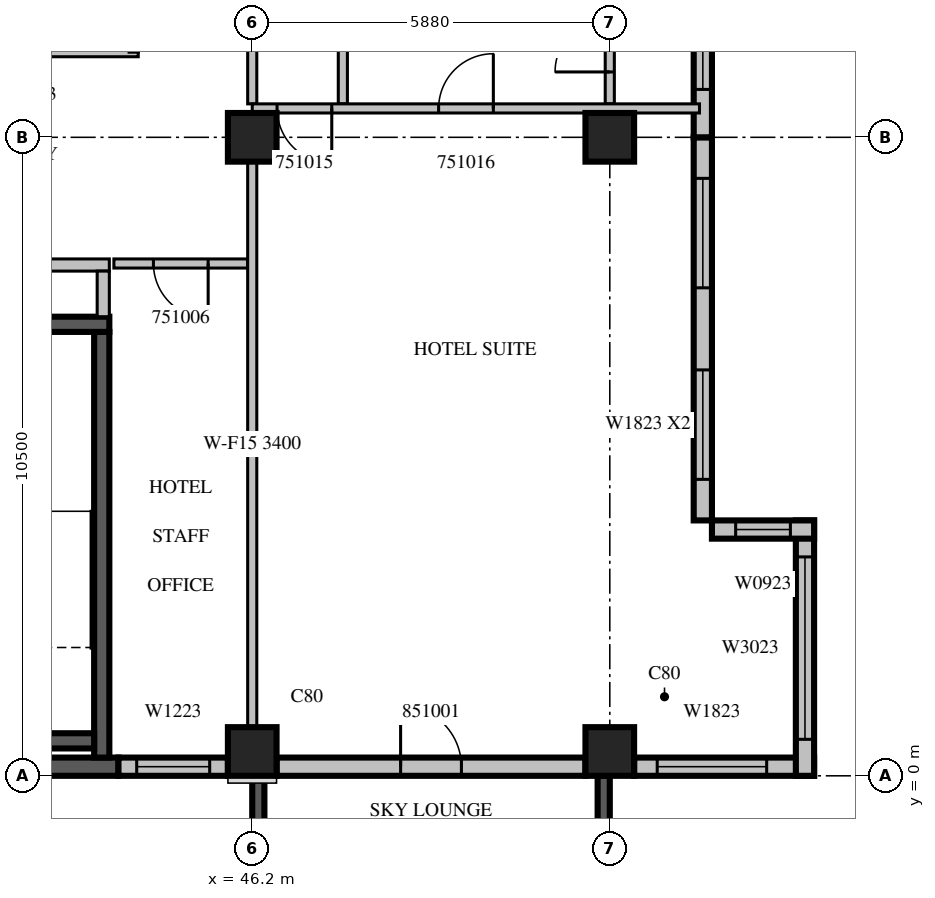
"""IFC4 building model, lengths in metres.
Left out: names, types, materials, properties, quantities, classifications, styles, units other than length and angle.
Written with IfcOpenShell. Run it as: python <this file> out.ifc"""

import sys

from ifc_helpers import new_model, si_unit, direction, frame, frame_2d, origin, origin_2d, place, context, subcontext, project, spatial, rectangle, extrude, source, transform, mapped, element, fill, save


model = new_model("IFC4")
c1 = context("Model", 3, precision=1e-05, world=origin(), true_north=direction((0.0, 1.0)))
c2 = subcontext(c1, "Body", "Model", "MODEL_VIEW")
j1 = project(units=[si_unit("LENGTHUNIT", "METRE"), si_unit("PLANEANGLEUNIT", "RADIAN")], contexts=[c1])
p1 = place(None, origin())
s1 = spatial("IfcSite", under=j1, at=p1, CompositionType="ELEMENT")
p2 = place(p1, origin())
s2 = spatial("IfcBuilding", under=s1, at=p2, CompositionType="ELEMENT")
p3 = place(p2, frame((0.0, 0.0, 227.2)))
s3 = spatial("IfcBuildingStorey", under=s2, at=p3, CompositionType="ELEMENT", Elevation=227.2)
m1 = source(origin(), c2, "Body", "SweptSolid", [
    extrude(rectangle(XDim=0.8, YDim=0.8, at=origin_2d()), origin(), (0.0, 0.0, 1.0), 3.8),
])
for number, where, z_axis, x_axis in (
    (1, (46.2, 0.4, 0.0), (0.0, 0.0, 1.0), (1.0, 0.0, 0.0)),
    (2, (52.08, 0.4, 0.0), (0.0, 0.0, 1.0), (1.0, 0.0, 0.0)),
    (3, (46.2, 10.5, 0.0), (0.0, 0.0, 1.0), (1.0, 0.0, 0.0)),
    (4, (52.08, 10.5, 0.0), (0.0, 0.0, 1.0), (1.0, 0.0, 0.0)),
):
    element("IfcColumn", number, at=place(p3, frame(where, z_axis=z_axis, x_axis=x_axis)), inside=s3, PredefinedType="COLUMN", context=c2, shape_type="MappedRepresentation", body=[
        mapped(m1, transform((0.0, 0.0, 0.0), scale=1.0)),
    ])
m2 = source(origin(), c2, "Body", "SweptSolid", [
    extrude(rectangle(XDim=3.9, YDim=0.2, at=frame_2d((1.95, 0.0))), origin(), (0.0, 0.0, 1.0), 3.4),
])
p4 = place(p3, frame((46.3, 0.0, 0.0), z_axis=(0.0, 0.0, 1.0), x_axis=(0.0, -1.0, 0.0)))
e5 = element("IfcWall", 5, at=p4, inside=s3, PredefinedType="SOLIDWALL", context=c2, shape_type="MappedRepresentation", body=[
    mapped(m2, transform((0.0, 0.0, 0.0), scale=1.0)),
])
m3 = source(origin(), c2, "Body", "SweptSolid", [
    extrude(rectangle(XDim=2.4, YDim=2.3, at=frame_2d((1.2, 1.15))), frame((0.0, 0.11, 0.0), z_axis=(0.0, -1.0, 0.0), x_axis=(1.0, 0.0, 0.0)), (0.0, 0.0, 1.0), 0.22),
])
p5 = place(p4, frame((0.75, 0.0, 0.6)))
e6 = element("IfcOpeningElement", 6, at=p5, cuts=e5, PredefinedType="OPENING", context=c2, shape_type="MappedRepresentation", body=[
    mapped(m3, transform((0.0, 0.0, 0.0), scale=1.0)),
])
p6 = place(p3, frame((51.98, 0.0, 0.0), z_axis=(0.0, 0.0, 1.0), x_axis=(0.0, -1.0, 0.0)))
e7 = element("IfcWall", 7, at=p6, inside=s3, PredefinedType="SOLIDWALL", context=c2, shape_type="MappedRepresentation", body=[
    mapped(m2, transform((0.0, 0.0, 0.0), scale=1.0)),
])
p7 = place(p6, frame((0.75, 0.0, 0.6)))
e8 = element("IfcOpeningElement", 8, at=p7, cuts=e7, PredefinedType="OPENING", context=c2, shape_type="MappedRepresentation", body=[
    mapped(m3, transform((0.0, 0.0, 0.0), scale=1.0)),
])
m4 = source(origin(), c2, "Body", "SweptSolid", [
    extrude(rectangle(XDim=3.8, YDim=0.3, at=frame_2d((1.9, 0.0))), origin(), (0.0, 0.0, 1.0), 3.4),
])
p8 = place(p3, frame((40.2, 0.15, 0.0), z_axis=(0.0, 0.0, 1.0), x_axis=(1.0, 0.0, 0.0)))
e9 = element("IfcWall", 9, at=p8, inside=s3, PredefinedType="SOLIDWALL", context=c2, shape_type="MappedRepresentation", body=[
    mapped(m4, transform((0.0, 0.0, 0.0), scale=1.0)),
])
p9 = place(p3, frame((44.0, 0.15, 0.0), z_axis=(0.0, 0.0, 1.0), x_axis=(1.0, 0.0, 0.0)))
e10 = element("IfcWall", 10, at=p9, inside=s3, PredefinedType="STANDARD", context=c2, shape_type="SweptSolid", body=[
    extrude(rectangle(XDim=1.8, YDim=0.3, at=frame_2d((0.9, 0.0))), origin(), (0.0, 0.0, 1.0), 3.4),
])
m5 = source(origin(), c2, "Body", "SweptSolid", [
    extrude(rectangle(XDim=1.2, YDim=2.3, at=frame_2d((0.6, 1.15))), frame((0.0, 0.16, 0.0), z_axis=(0.0, -1.0, 0.0), x_axis=(1.0, 0.0, 0.0)), (0.0, 0.0, 1.0), 0.32),
])
p10 = place(p9, frame((0.3, 0.0, 0.6)))
e11 = element("IfcOpeningElement", 11, at=p10, cuts=e10, PredefinedType="OPENING", context=c2, shape_type="MappedRepresentation", body=[
    mapped(m5, transform((0.0, 0.0, 0.0), scale=1.0)),
])
p11 = place(p3, frame((46.6, 0.15, 0.0), z_axis=(0.0, 0.0, 1.0), x_axis=(1.0, 0.0, 0.0)))
e12 = element("IfcWall", 12, at=p11, inside=s3, PredefinedType="STANDARD", context=c2, shape_type="SweptSolid", body=[
    extrude(rectangle(XDim=5.08, YDim=0.3, at=frame_2d((2.54, 0.0))), origin(), (0.0, 0.0, 1.0), 3.4),
])
m6 = source(origin(), c2, "Body", "SweptSolid", [
    extrude(rectangle(XDim=1.0, YDim=2.1, at=frame_2d((0.5, 1.05))), frame((0.0, 0.16, 0.0), z_axis=(0.0, -1.0, 0.0), x_axis=(1.0, 0.0, 0.0)), (0.0, 0.0, 1.0), 0.32),
])
p12 = place(p11, frame((2.04, 0.0, 0.0)))
e13 = element("IfcOpeningElement", 13, at=p12, cuts=e12, PredefinedType="OPENING", context=c2, shape_type="MappedRepresentation", body=[
    mapped(m6, transform((0.0, 0.0, 0.0), scale=1.0)),
])
p13 = place(p3, frame((52.48, 0.15, 0.0), z_axis=(0.0, 0.0, 1.0), x_axis=(1.0, 0.0, 0.0)))
e14 = element("IfcWall", 14, at=p13, inside=s3, PredefinedType="STANDARD", context=c2, shape_type="SweptSolid", body=[
    extrude(rectangle(XDim=2.96, YDim=0.3, at=frame_2d((1.48, 0.0))), origin(), (0.0, 0.0, 1.0), 3.4),
])
m7 = source(origin(), c2, "Body", "SweptSolid", [
    extrude(rectangle(XDim=1.8, YDim=2.3, at=frame_2d((0.9, 1.15))), frame((0.0, 0.16, 0.0), z_axis=(0.0, -1.0, 0.0), x_axis=(1.0, 0.0, 0.0)), (0.0, 0.0, 1.0), 0.32),
])
p14 = place(p13, frame((0.38, 0.0, 0.6)))
e15 = element("IfcOpeningElement", 15, at=p14, cuts=e14, PredefinedType="OPENING", context=c2, shape_type="MappedRepresentation", body=[
    mapped(m7, transform((0.0, 0.0, 0.0), scale=1.0)),
])
m8 = source(origin(), c2, "Body", "SweptSolid", [
    extrude(rectangle(XDim=4.2, YDim=0.3, at=frame_2d((2.1, 0.0))), origin(), (0.0, 0.0, 1.0), 3.4),
])
p15 = place(p3, frame((55.29, 0.0, 0.0), z_axis=(0.0, 0.0, 1.0), x_axis=(0.0, 1.0, 0.0)))
e16 = element("IfcWall", 16, at=p15, inside=s3, PredefinedType="STANDARD", context=c2, shape_type="MappedRepresentation", body=[
    mapped(m8, transform((0.0, 0.0, 0.0), scale=1.0)),
])
m9 = source(origin(), c2, "Body", "SweptSolid", [
    extrude(rectangle(XDim=3.0, YDim=2.3, at=frame_2d((1.5, 1.15))), frame((0.0, 0.16, 0.0), z_axis=(0.0, -1.0, 0.0), x_axis=(1.0, 0.0, 0.0)), (0.0, 0.0, 1.0), 0.32),
])
p16 = place(p15, frame((0.6, 0.0, 0.6)))
e17 = element("IfcOpeningElement", 17, at=p16, cuts=e16, PredefinedType="OPENING", context=c2, shape_type="MappedRepresentation", body=[
    mapped(m9, transform((0.0, 0.0, 0.0), scale=1.0)),
])
m10 = source(origin(), c2, "Body", "SweptSolid", [
    extrude(rectangle(XDim=1.68, YDim=0.3, at=frame_2d((0.84, 0.0))), origin(), (0.0, 0.0, 1.0), 3.4),
])
p17 = place(p3, frame((55.44, 4.05, 0.0), z_axis=(0.0, 0.0, 1.0), x_axis=(-1.0, 0.0, 0.0)))
e18 = element("IfcWall", 18, at=p17, inside=s3, PredefinedType="STANDARD", context=c2, shape_type="MappedRepresentation", body=[
    mapped(m10, transform((0.0, 0.0, 0.0), scale=1.0)),
])
m11 = source(origin(), c2, "Body", "SweptSolid", [
    extrude(rectangle(XDim=0.9, YDim=2.3, at=frame_2d((0.45, 1.15))), frame((0.0, 0.16, 0.0), z_axis=(0.0, -1.0, 0.0), x_axis=(1.0, 0.0, 0.0)), (0.0, 0.0, 1.0), 0.32),
])
p18 = place(p17, frame((0.39, 0.0, 0.6)))
e19 = element("IfcOpeningElement", 19, at=p18, cuts=e18, PredefinedType="OPENING", context=c2, shape_type="MappedRepresentation", body=[
    mapped(m11, transform((0.0, 0.0, 0.0), scale=1.0)),
])
m12 = source(origin(), c2, "Body", "SweptSolid", [
    extrude(rectangle(XDim=6.3, YDim=0.3, at=frame_2d((3.15, 0.0))), origin(), (0.0, 0.0, 1.0), 3.4),
])
p19 = place(p3, frame((53.61, 4.2, 0.0), z_axis=(0.0, 0.0, 1.0), x_axis=(0.0, 1.0, 0.0)))
e20 = element("IfcWall", 20, at=p19, inside=s3, PredefinedType="STANDARD", context=c2, shape_type="MappedRepresentation", body=[
    mapped(m12, transform((0.0, 0.0, 0.0), scale=1.0)),
])
p20 = place(p19, frame((0.675, 0.0, 0.6)))
e21 = element("IfcOpeningElement", 21, at=p20, cuts=e20, PredefinedType="OPENING", context=c2, shape_type="MappedRepresentation", body=[
    mapped(m7, transform((0.0, 0.0, 0.0), scale=1.0)),
])
p21 = place(p19, frame((3.825, 0.0, 0.6)))
e22 = element("IfcOpeningElement", 22, at=p21, cuts=e20, PredefinedType="OPENING", context=c2, shape_type="MappedRepresentation", body=[
    mapped(m7, transform((0.0, 0.0, 0.0), scale=1.0)),
])
m13 = source(origin(), c2, "Body", "SweptSolid", [
    extrude(rectangle(XDim=3.375, YDim=0.3, at=frame_2d((1.688, 0.0))), origin(), (0.0, 0.0, 1.0), 3.4),
])
p22 = place(p3, frame((53.61, 10.5, 0.0), z_axis=(0.0, 0.0, 1.0), x_axis=(0.0, 1.0, 0.0)))
e23 = element("IfcWall", 23, at=p22, inside=s3, PredefinedType="STANDARD", context=c2, shape_type="MappedRepresentation", body=[
    mapped(m13, transform((0.0, 0.0, 0.0), scale=1.0)),
])
p23 = place(p22, frame((0.787, 0.0, 0.6)))
e24 = element("IfcOpeningElement", 24, at=p23, cuts=e23, PredefinedType="OPENING", context=c2, shape_type="MappedRepresentation", body=[
    mapped(m7, transform((0.0, 0.0, 0.0), scale=1.0)),
])
m14 = source(origin(), c2, "Body", "SweptSolid", [
    extrude(rectangle(XDim=7.0, YDim=0.25, at=frame_2d((3.5, 0.0))), origin(), (0.0, 0.0, 1.0), 3.4),
])
p24 = place(p3, frame((43.725, 0.3, 0.0), z_axis=(0.0, 0.0, 1.0), x_axis=(0.0, 1.0, 0.0)))
e25 = element("IfcWall", 25, at=p24, inside=s3, PredefinedType="SOLIDWALL", context=c2, shape_type="MappedRepresentation", body=[
    mapped(m14, transform((0.0, 0.0, 0.0), scale=1.0)),
])
m15 = source(origin(), c2, "Body", "SweptSolid", [
    extrude(rectangle(XDim=3.45, YDim=0.25, at=frame_2d((1.725, 0.0))), origin(), (0.0, 0.0, 1.0), 3.4),
])
p25 = place(p3, frame((40.4, 7.425, 0.0), z_axis=(0.0, 0.0, 1.0), x_axis=(1.0, 0.0, 0.0)))
e26 = element("IfcWall", 26, at=p25, inside=s3, PredefinedType="SOLIDWALL", context=c2, shape_type="MappedRepresentation", body=[
    mapped(m15, transform((0.0, 0.0, 0.0), scale=1.0)),
])
m16 = source(origin(), c2, "Body", "SweptSolid", [
    extrude(rectangle(XDim=2.95, YDim=0.25, at=frame_2d((1.475, 0.0))), origin(), (0.0, 0.0, 1.0), 3.4),
])
p26 = place(p3, frame((40.65, 0.575, 0.0), z_axis=(0.0, 0.0, 1.0), x_axis=(1.0, 0.0, 0.0)))
e27 = element("IfcWall", 27, at=p26, inside=s3, PredefinedType="SOLIDWALL", context=c2, shape_type="MappedRepresentation", body=[
    mapped(m16, transform((0.0, 0.0, 0.0), scale=1.0)),
])
m17 = source(origin(), c2, "Body", "SweptSolid", [
    extrude(rectangle(XDim=5.45, YDim=0.2, at=frame_2d((2.725, 0.0))), origin(), (0.0, 0.0, 1.0), 3.4),
])
p27 = place(p3, frame((38.4, 8.4, 0.0), z_axis=(0.0, 0.0, 1.0), x_axis=(1.0, 0.0, 0.0)))
e28 = element("IfcWall", 28, at=p27, inside=s3, PredefinedType="PARTITIONING", context=c2, shape_type="MappedRepresentation", body=[
    mapped(m17, transform((0.0, 0.0, 0.0), scale=1.0)),
])
m18 = source(origin(), c2, "Body", "SweptSolid", [
    extrude(rectangle(XDim=1.2, YDim=2.1, at=frame_2d((0.6, 1.05))), frame((0.0, 0.11, 0.0), z_axis=(0.0, -1.0, 0.0), x_axis=(1.0, 0.0, 0.0)), (0.0, 0.0, 1.0), 0.22),
])
p28 = place(p27, frame((0.4, 0.0, 0.0)))
e29 = element("IfcOpeningElement", 29, at=p28, cuts=e28, PredefinedType="OPENING", context=c2, shape_type="MappedRepresentation", body=[
    mapped(m18, transform((0.0, 0.0, 0.0), scale=1.0)),
])
m19 = source(origin(), c2, "Body", "SweptSolid", [
    extrude(rectangle(XDim=0.9, YDim=2.1, at=frame_2d((0.45, 1.05))), frame((0.0, 0.11, 0.0), z_axis=(0.0, -1.0, 0.0), x_axis=(1.0, 0.0, 0.0)), (0.0, 0.0, 1.0), 0.22),
])
p29 = place(p27, frame((3.25, 0.0, 0.0)))
e30 = element("IfcOpeningElement", 30, at=p29, cuts=e28, PredefinedType="OPENING", context=c2, shape_type="MappedRepresentation", body=[
    mapped(m19, transform((0.0, 0.0, 0.0), scale=1.0)),
])
m20 = source(origin(), c2, "Body", "SweptSolid", [
    extrude(rectangle(XDim=0.75, YDim=0.2, at=frame_2d((0.375, 0.0))), origin(), (0.0, 0.0, 1.0), 3.4),
])
p30 = place(p3, frame((43.75, 7.55, 0.0), z_axis=(0.0, 0.0, 1.0), x_axis=(0.0, 1.0, 0.0)))
e31 = element("IfcWall", 31, at=p30, inside=s3, PredefinedType="PARTITIONING", context=c2, shape_type="MappedRepresentation", body=[
    mapped(m20, transform((0.0, 0.0, 0.0), scale=1.0)),
])
m21 = source(origin(), c2, "Body", "SweptSolid", [
    extrude(rectangle(XDim=6.45, YDim=0.15, at=frame_2d((3.225, 0.0))), origin(), (0.0, 0.0, 1.0), 3.4),
])
p31 = place(p3, frame((37.875, 11.9, 0.0), z_axis=(0.0, 0.0, 1.0), x_axis=(1.0, 0.0, 0.0)))
e32 = element("IfcWall", 32, at=p31, inside=s3, PredefinedType="PARTITIONING", context=c2, shape_type="MappedRepresentation", body=[
    mapped(m21, transform((0.0, 0.0, 0.0), scale=1.0)),
])
m22 = source(origin(), c2, "Body", "SweptSolid", [
    extrude(rectangle(XDim=2.2, YDim=0.15, at=frame_2d((1.1, 0.0))), origin(), (0.0, 0.0, 1.0), 3.4),
])
p32 = place(p3, frame((46.125, 8.425, 0.0), z_axis=(0.0, 0.0, 1.0), x_axis=(-1.0, 0.0, 0.0)))
e33 = element("IfcWall", 33, at=p32, inside=s3, PredefinedType="PARTITIONING", context=c2, shape_type="MappedRepresentation", body=[
    mapped(m22, transform((0.0, 0.0, 0.0), scale=1.0)),
])
m23 = source(origin(), c2, "Body", "SweptSolid", [
    extrude(rectangle(XDim=0.9, YDim=2.1, at=frame_2d((0.45, 1.05))), frame((0.0, 0.085, 0.0), z_axis=(0.0, -1.0, 0.0), x_axis=(1.0, 0.0, 0.0)), (0.0, 0.0, 1.0), 0.17),
])
p33 = place(p32, frame((0.65, 0.0, 0.0)))
e34 = element("IfcOpeningElement", 34, at=p33, cuts=e33, PredefinedType="OPENING", context=c2, shape_type="MappedRepresentation", body=[
    mapped(m23, transform((0.0, 0.0, 0.0), scale=1.0)),
])
m24 = source(origin(), c2, "Body", "SweptSolid", [
    extrude(rectangle(XDim=3.95, YDim=0.15, at=frame_2d((1.975, 0.0))), origin(), (0.0, 0.0, 1.0), 3.4),
])
p34 = place(p3, frame((47.69, 11.05, 0.0), z_axis=(0.0, 0.0, 1.0), x_axis=(0.0, 1.0, 0.0)))
e35 = element("IfcWall", 35, at=p34, inside=s3, PredefinedType="PARTITIONING", context=c2, shape_type="MappedRepresentation", body=[
    mapped(m24, transform((0.0, 0.0, 0.0), scale=1.0)),
])
p35 = place(p3, frame((52.08, 11.05, 0.0), z_axis=(0.0, 0.0, 1.0), x_axis=(0.0, 1.0, 0.0)))
e36 = element("IfcWall", 36, at=p35, inside=s3, PredefinedType="PARTITIONING", context=c2, shape_type="MappedRepresentation", body=[
    mapped(m24, transform((0.0, 0.0, 0.0), scale=1.0)),
])
p36 = place(p35, frame((1.525, 0.0, 0.0)))
e37 = element("IfcOpeningElement", 37, at=p36, cuts=e36, PredefinedType="OPENING", context=c2, shape_type="MappedRepresentation", body=[
    mapped(m23, transform((0.0, 0.0, 0.0), scale=1.0)),
])
p37 = place(p35, frame((2.525, 0.0, 0.0)))
e38 = element("IfcOpeningElement", 38, at=p37, cuts=e36, PredefinedType="OPENING", context=c2, shape_type="MappedRepresentation", body=[
    mapped(m23, transform((0.0, 0.0, 0.0), scale=1.0)),
])
p38 = place(p35, frame((0.525, 0.0, 0.0)))
e39 = element("IfcOpeningElement", 39, at=p38, cuts=e36, PredefinedType="OPENING", context=c2, shape_type="MappedRepresentation", body=[
    mapped(m23, transform((0.0, 0.0, 0.0), scale=1.0)),
])
m25 = source(origin(), c2, "Body", "SweptSolid", [
    extrude(rectangle(XDim=9.302, YDim=0.15, at=frame_2d((4.651, 0.0))), origin(), (0.0, 0.0, 1.0), 3.4),
])
p39 = place(p3, frame((46.2, 0.799, 0.0), z_axis=(0.0, 0.0, 1.0), x_axis=(0.0, 1.0, 0.0)))
e40 = element("IfcWall", 40, at=p39, inside=s3, PredefinedType="PARTITIONING", context=c2, shape_type="MappedRepresentation", body=[
    mapped(m25, transform((0.0, 0.0, 0.0), scale=1.0)),
])
p40 = place(p3, frame((46.2, 11.05, 0.0), z_axis=(0.0, 0.0, 1.0), x_axis=(0.0, 1.0, 0.0)))
e41 = element("IfcWall", 41, at=p40, inside=s3, PredefinedType="PARTITIONING", context=c2, shape_type="MappedRepresentation", body=[
    mapped(m24, transform((0.0, 0.0, 0.0), scale=1.0)),
])
m26 = source(origin(), c2, "Body", "SweptSolid", [
    extrude(rectangle(XDim=7.355, YDim=0.15, at=frame_2d((3.678, 0.0))), origin(), (0.0, 0.0, 1.0), 3.4),
])
p41 = place(p3, frame((53.555, 10.975, 0.0), z_axis=(0.0, 0.0, 1.0), x_axis=(-1.0, 0.0, 0.0)))
e42 = element("IfcWall", 42, at=p41, inside=s3, PredefinedType="PARTITIONING", context=c2, shape_type="MappedRepresentation", body=[
    mapped(m26, transform((0.0, 0.0, 0.0), scale=1.0)),
])
p42 = place(p41, frame((6.047, 0.0, 0.0)))
e43 = element("IfcOpeningElement", 43, at=p42, cuts=e42, PredefinedType="OPENING", context=c2, shape_type="MappedRepresentation", body=[
    mapped(m23, transform((0.0, 0.0, 0.0), scale=1.0)),
])
p43 = place(p41, frame((3.39, 0.0, 0.0)))
e44 = element("IfcOpeningElement", 44, at=p43, cuts=e42, PredefinedType="OPENING", context=c2, shape_type="MappedRepresentation", body=[
    mapped(m23, transform((0.0, 0.0, 0.0), scale=1.0)),
])
m27 = source(origin(), c2, "Body", "SweptSolid", [
    extrude(rectangle(XDim=1.2, YDim=2.3, at=frame_2d((0.6, 1.15))), frame((0.0, 0.03, 0.0), z_axis=(0.0, -1.0, 0.0), x_axis=(1.0, 0.0, 0.0)), (0.0, 0.0, 1.0), 0.06),
])
p44 = place(p10, origin())
e45 = element("IfcWindow", 45, at=p44, inside=s3, PartitioningType="SINGLE_PANEL", PredefinedType="WINDOW", context=c2, shape_type="MappedRepresentation", body=[
    mapped(m27, transform((0.0, 0.0, 0.0), scale=1.0)),
])
fill(e11, e45)
m28 = source(origin(), c2, "Body", "SweptSolid", [
    extrude(rectangle(XDim=1.8, YDim=2.3, at=frame_2d((0.9, 1.15))), frame((0.0, 0.03, 0.0), z_axis=(0.0, -1.0, 0.0), x_axis=(1.0, 0.0, 0.0)), (0.0, 0.0, 1.0), 0.06),
])
p45 = place(p14, origin())
e46 = element("IfcWindow", 46, at=p45, inside=s3, PartitioningType="SINGLE_PANEL", PredefinedType="WINDOW", context=c2, shape_type="MappedRepresentation", body=[
    mapped(m28, transform((0.0, 0.0, 0.0), scale=1.0)),
])
fill(e15, e46)
m29 = source(origin(), c2, "Body", "SweptSolid", [
    extrude(rectangle(XDim=3.0, YDim=2.3, at=frame_2d((1.5, 1.15))), frame((0.0, 0.03, 0.0), z_axis=(0.0, -1.0, 0.0), x_axis=(1.0, 0.0, 0.0)), (0.0, 0.0, 1.0), 0.06),
])
p46 = place(p16, origin())
e47 = element("IfcWindow", 47, at=p46, inside=s3, PartitioningType="SINGLE_PANEL", PredefinedType="WINDOW", context=c2, shape_type="MappedRepresentation", body=[
    mapped(m29, transform((0.0, 0.0, 0.0), scale=1.0)),
])
fill(e17, e47)
m30 = source(origin(), c2, "Body", "SweptSolid", [
    extrude(rectangle(XDim=0.9, YDim=2.3, at=frame_2d((0.45, 1.15))), frame((0.0, 0.03, 0.0), z_axis=(0.0, -1.0, 0.0), x_axis=(1.0, 0.0, 0.0)), (0.0, 0.0, 1.0), 0.06),
])
p47 = place(p18, origin())
e48 = element("IfcWindow", 48, at=p47, inside=s3, PartitioningType="SINGLE_PANEL", PredefinedType="WINDOW", context=c2, shape_type="MappedRepresentation", body=[
    mapped(m30, transform((0.0, 0.0, 0.0), scale=1.0)),
])
fill(e19, e48)
p48 = place(p20, origin())
e49 = element("IfcWindow", 49, at=p48, inside=s3, PartitioningType="SINGLE_PANEL", PredefinedType="WINDOW", context=c2, shape_type="MappedRepresentation", body=[
    mapped(m28, transform((0.0, 0.0, 0.0), scale=1.0)),
])
fill(e21, e49)
p49 = place(p21, origin())
e50 = element("IfcWindow", 50, at=p49, inside=s3, PartitioningType="SINGLE_PANEL", PredefinedType="WINDOW", context=c2, shape_type="MappedRepresentation", body=[
    mapped(m28, transform((0.0, 0.0, 0.0), scale=1.0)),
])
fill(e22, e50)
p50 = place(p23, origin())
e51 = element("IfcWindow", 51, at=p50, inside=s3, PartitioningType="SINGLE_PANEL", PredefinedType="WINDOW", context=c2, shape_type="MappedRepresentation", body=[
    mapped(m28, transform((0.0, 0.0, 0.0), scale=1.0)),
])
fill(e24, e51)
m31 = source(origin(), c2, "Body", "SweptSolid", [
    extrude(rectangle(XDim=0.9, YDim=2.1, at=frame_2d((0.45, 1.05))), frame((0.0, 0.025, 0.0), z_axis=(0.0, -1.0, 0.0), x_axis=(1.0, 0.0, 0.0)), (0.0, 0.0, 1.0), 0.05),
])
p51 = place(p33, origin())
e52 = element("IfcDoor", 52, at=p51, inside=s3, OperationType="SINGLE_SWING_LEFT", PredefinedType="DOOR", context=c2, shape_type="MappedRepresentation", body=[
    mapped(m31, transform((0.0, 0.0, 0.0), scale=1.0)),
])
fill(e34, e52)
p52 = place(p42, origin())
e53 = element("IfcDoor", 53, at=p52, inside=s3, OperationType="SINGLE_SWING_LEFT", PredefinedType="DOOR", context=c2, shape_type="MappedRepresentation", body=[
    mapped(m31, transform((0.0, 0.0, 0.0), scale=1.0)),
])
fill(e43, e53)
p53 = place(p43, origin())
e54 = element("IfcDoor", 54, at=p53, inside=s3, OperationType="SINGLE_SWING_RIGHT", PredefinedType="DOOR", context=c2, shape_type="MappedRepresentation", body=[
    mapped(m31, transform((0.0, 0.0, 0.0), scale=1.0)),
])
fill(e44, e54)
p54 = place(p38, origin())
e55 = element("IfcDoor", 55, at=p54, inside=s3, OperationType="SINGLE_SWING_LEFT", PredefinedType="DOOR", context=c2, shape_type="MappedRepresentation", body=[
    mapped(m31, transform((0.0, 0.0, 0.0), scale=1.0)),
])
fill(e39, e55)
m32 = source(origin(), c2, "Body", "SweptSolid", [
    extrude(rectangle(XDim=1.0, YDim=2.1, at=frame_2d((0.5, 1.05))), frame((0.0, 0.025, 0.0), z_axis=(0.0, -1.0, 0.0), x_axis=(1.0, 0.0, 0.0)), (0.0, 0.0, 1.0), 0.05),
])
p55 = place(p12, origin())
e56 = element("IfcDoor", 56, at=p55, inside=s3, OperationType="SINGLE_SWING_LEFT", PredefinedType="DOOR", context=c2, shape_type="MappedRepresentation", body=[
    mapped(m32, transform((0.0, 0.0, 0.0), scale=1.0)),
])
fill(e13, e56)
save(model, sys.argv[1])
